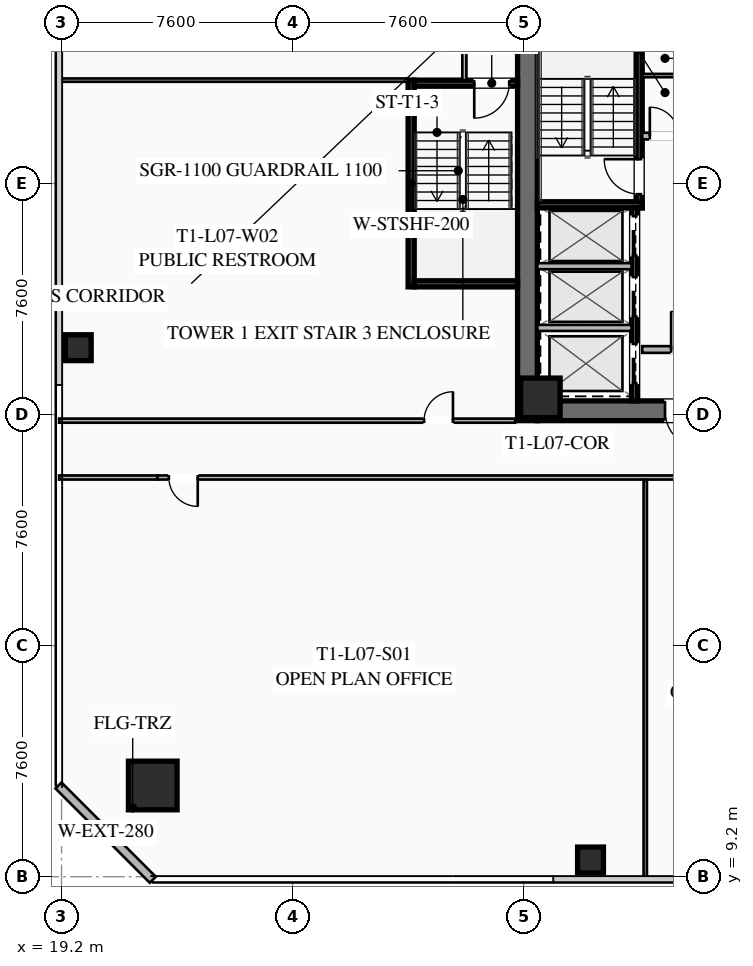
"""IFC4 building model, lengths in metres.
Left out: names, types, materials, properties, quantities, classifications, styles, units other than length and angle.
Written with IfcOpenShell. Run it as: python <this file> out.ifc"""

import sys

from ifc_helpers import new_model, si_unit, direction, frame, frame_2d, origin, origin_2d, place, context, subcontext, project, spatial, rectangle, hollow_rectangle, extrude, element, fill, save


model = new_model("IFC4")
c1 = context("Model", 3, precision=1e-05, world=origin(), true_north=direction((0.0, 1.0)))
c2 = subcontext(c1, "Body", "Model", "MODEL_VIEW")
j1 = project(units=[si_unit("LENGTHUNIT", "METRE"), si_unit("PLANEANGLEUNIT", "RADIAN")], contexts=[c1])
p1 = place(None, origin())
s1 = spatial("IfcSite", under=j1, at=p1, CompositionType="ELEMENT")
p2 = place(p1, origin())
s2 = spatial("IfcBuilding", under=s1, at=p2, CompositionType="ELEMENT")
p3 = place(p2, frame((0.0, 0.0, 31.7)))
s3 = spatial("IfcBuildingStorey", under=s2, at=p3, CompositionType="ELEMENT", Elevation=31.7)
p4 = place(p3, frame((34.525, 24.2, 0.0), z_axis=(0.0, 0.0, 1.0), x_axis=(0.0, 1.0, 0.0)))
e1 = element("IfcWall", 1, at=p4, inside=s3, PredefinedType="SHEAR", context=c2, shape_type="SweptSolid", body=[
    extrude(rectangle(XDim=15.6, YDim=0.65, at=frame_2d((7.8, 0.0))), origin(), (0.0, 0.0, 1.0), 3.55),
])
p5 = place(p3, frame((49.15, 24.525, 0.0), z_axis=(0.0, 0.0, 1.0), x_axis=(-1.0, 0.0, 0.0)))
e2 = element("IfcWall", 2, at=p5, inside=s3, PredefinedType="SHEAR", context=c2, shape_type="SweptSolid", body=[
    extrude(rectangle(XDim=14.3, YDim=0.65, at=frame_2d((7.15, 0.0))), origin(), (0.0, 0.0, 1.0), 3.55),
])
p6 = place(p5, frame((8.85, 0.0, 0.0)))
e3 = element("IfcOpeningElement", 3, at=p6, cuts=e2, PredefinedType="OPENING", context=c2, shape_type="SweptSolid", body=[
    extrude(rectangle(XDim=1.25, YDim=2.25, at=frame_2d((0.625, 1.125))), frame((0.0, 0.335, 0.0), z_axis=(0.0, -1.0, 0.0), x_axis=(1.0, 0.0, 0.0)), (0.0, 0.0, 1.0), 0.67),
])
p7 = place(p5, frame((3.8, 0.0, 0.0)))
e4 = element("IfcOpeningElement", 4, at=p7, cuts=e2, PredefinedType="OPENING", context=c2, shape_type="SweptSolid", body=[
    extrude(rectangle(XDim=1.25, YDim=2.25, at=frame_2d((0.625, 1.125))), frame((0.0, 0.335, 0.0), z_axis=(0.0, -1.0, 0.0), x_axis=(1.0, 0.0, 0.0)), (0.0, 0.0, 1.0), 0.67),
])
p8 = place(p3, frame((34.95, 24.95, 0.0), z_axis=(0.0, 0.0, 1.0), x_axis=(1.0, 0.0, 0.0)))
e5 = element("IfcColumn", 5, at=p8, inside=s3, PredefinedType="COLUMN", context=c2, shape_type="SweptSolid", body=[
    extrude(hollow_rectangle(XDim=1.3, YDim=1.3, WallThickness=0.05, at=origin_2d()), origin(), (0.0, 0.0, 1.0), 3.35),
])
p9 = place(p3, frame((22.2, 12.2, 0.0), z_axis=(0.0, 0.0, 1.0), x_axis=(1.0, 0.0, 0.0)))
e6 = element("IfcColumn", 6, at=p9, inside=s3, PredefinedType="COLUMN", context=c2, shape_type="SweptSolid", body=[
    extrude(hollow_rectangle(XDim=1.6, YDim=1.6, WallThickness=0.06, at=origin_2d()), origin(), (0.0, 0.0, 1.0), 3.35),
])
for number, where, z_axis, x_axis in (
    (7, (36.6, 9.75, 0.0), (0.0, 0.0, 1.0), (1.0, 0.0, 0.0)),
    (8, (19.75, 26.6, 0.0), (0.0, 0.0, 1.0), (1.0, 0.0, 0.0)),
):
    element("IfcColumn", number, at=place(p3, frame(where, z_axis=z_axis, x_axis=x_axis)), inside=s3, PredefinedType="COLUMN", context=c2, shape_type="SweptSolid", body=[
        extrude(hollow_rectangle(XDim=0.85, YDim=0.85, WallThickness=0.035, at=origin_2d()), origin(), (0.0, 0.0, 1.0), 3.35),
    ])
p10 = place(p3, frame((22.2, 9.1, 0.0), z_axis=(0.0, 0.0, 1.0), x_axis=(-0.707106781187, 0.707106781187, 0.0)))
e9 = element("IfcWall", 9, at=p10, inside=s3, PredefinedType="SOLIDWALL", context=c2, shape_type="SweptSolid", body=[
    extrude(rectangle(XDim=4.384, YDim=0.28, at=frame_2d((2.192, 0.0))), origin(), (0.0, 0.0, 1.0), 3.35),
])
p11 = place(p3, frame((38.2, 31.2, 0.0), z_axis=(0.0, 0.0, 1.0), x_axis=(0.0, 1.0, 0.0)))
e10 = element("IfcWall", 10, at=p11, inside=s3, PredefinedType="SHEAR", context=c2, shape_type="SweptSolid", body=[
    extrude(rectangle(XDim=7.95, YDim=0.2, at=frame_2d((3.975, 0.0))), origin(), (0.0, 0.0, 1.0), 3.35),
])
p12 = place(p11, frame((0.45, 0.0, 0.0)))
e11 = element("IfcOpeningElement", 11, at=p12, cuts=e10, PredefinedType="OPENING", context=c2, shape_type="SweptSolid", body=[
    extrude(rectangle(XDim=1.15, YDim=2.2, at=frame_2d((0.575, 1.1))), frame((0.0, 0.11, 0.0), z_axis=(0.0, -1.0, 0.0), x_axis=(1.0, 0.0, 0.0)), (0.0, 0.0, 1.0), 0.22),
])
p13 = place(p3, frame((34.85, 31.3, 0.0), z_axis=(0.0, 0.0, 1.0), x_axis=(1.0, 0.0, 0.0)))
e12 = element("IfcWall", 12, at=p13, inside=s3, PredefinedType="SHEAR", context=c2, shape_type="SweptSolid", body=[
    extrude(rectangle(XDim=3.45, YDim=0.2, at=frame_2d((1.725, 0.0))), origin(), (0.0, 0.0, 1.0), 3.35),
])
p14 = place(p3, frame((38.3, 33.56, 0.0), z_axis=(0.0, 0.0, 1.0), x_axis=(1.0, 0.0, 0.0)))
e13 = element("IfcWall", 13, at=p14, inside=s3, PredefinedType="SOLIDWALL", context=c2, shape_type="SweptSolid", body=[
    extrude(rectangle(XDim=3.15, YDim=0.22, at=frame_2d((1.575, 0.0))), origin(), (0.0, 0.0, 1.0), 2.703),
])
p15 = place(p14, frame((0.25, 0.0, 0.0)))
e14 = element("IfcOpeningElement", 14, at=p15, cuts=e13, PredefinedType="OPENING", context=c2, shape_type="SweptSolid", body=[
    extrude(rectangle(XDim=0.95, YDim=2.05, at=frame_2d((0.475, 1.025))), frame((0.0, 0.12, 0.0), z_axis=(0.0, -1.0, 0.0), x_axis=(1.0, 0.0, 0.0)), (0.0, 0.0, 1.0), 0.24),
])
p16 = place(p14, frame((1.95, 0.0, 0.0)))
e15 = element("IfcOpeningElement", 15, at=p16, cuts=e13, PredefinedType="OPENING", context=c2, shape_type="SweptSolid", body=[
    extrude(rectangle(XDim=0.95, YDim=2.05, at=frame_2d((0.475, 1.025))), frame((0.0, 0.12, 0.0), z_axis=(0.0, -1.0, 0.0), x_axis=(1.0, 0.0, 0.0)), (0.0, 0.0, 1.0), 0.24),
])
p17 = place(p3, frame((38.3, 26.54, 0.0), z_axis=(0.0, 0.0, 1.0), x_axis=(1.0, 0.0, 0.0)))
e16 = element("IfcWall", 16, at=p17, inside=s3, PredefinedType="SOLIDWALL", context=c2, shape_type="SweptSolid", body=[
    extrude(rectangle(XDim=3.15, YDim=0.22, at=frame_2d((1.575, 0.0))), origin(), (0.0, 0.0, 1.0), 2.703),
])
p18 = place(p17, frame((0.95, 0.0, 0.0)))
e17 = element("IfcOpeningElement", 17, at=p18, cuts=e16, PredefinedType="OPENING", context=c2, shape_type="SweptSolid", body=[
    extrude(rectangle(XDim=1.25, YDim=2.25, at=frame_2d((0.625, 1.125))), frame((0.0, 0.12, 0.0), z_axis=(0.0, -1.0, 0.0), x_axis=(1.0, 0.0, 0.0)), (0.0, 0.0, 1.0), 0.24),
])
p19 = place(p3, frame((38.05, 24.85, 0.0), z_axis=(0.0, 0.0, 1.0), x_axis=(0.0, 1.0, 0.0)))
e18 = element("IfcWall", 18, at=p19, inside=s3, PredefinedType="SHEAR", context=c2, shape_type="SweptSolid", body=[
    extrude(rectangle(XDim=6.35, YDim=0.2, at=frame_2d((3.175, 0.0))), origin(), (0.0, 0.0, 1.0), 3.35),
])
p20 = place(p19, frame((4.775, 0.0, 0.0)))
e19 = element("IfcOpeningElement", 19, at=p20, cuts=e18, PredefinedType="OPENING", context=c2, shape_type="SweptSolid", body=[
    extrude(rectangle(XDim=1.3, YDim=2.25, at=frame_2d((0.65, 1.125))), frame((0.0, 0.11, 0.0), z_axis=(0.0, -1.0, 0.0), x_axis=(1.0, 0.0, 0.0)), (0.0, 0.0, 1.0), 0.22),
])
p21 = place(p19, frame((2.775, 0.0, 0.0)))
e20 = element("IfcOpeningElement", 20, at=p21, cuts=e18, PredefinedType="OPENING", context=c2, shape_type="SweptSolid", body=[
    extrude(rectangle(XDim=1.3, YDim=2.25, at=frame_2d((0.65, 1.125))), frame((0.0, 0.11, 0.0), z_axis=(0.0, -1.0, 0.0), x_axis=(1.0, 0.0, 0.0)), (0.0, 0.0, 1.0), 0.22),
])
p22 = place(p19, frame((0.575, 0.0, 0.0)))
e21 = element("IfcOpeningElement", 21, at=p22, cuts=e18, PredefinedType="OPENING", context=c2, shape_type="SweptSolid", body=[
    extrude(rectangle(XDim=1.3, YDim=2.25, at=frame_2d((0.65, 1.125))), frame((0.0, 0.11, 0.0), z_axis=(0.0, -1.0, 0.0), x_axis=(1.0, 0.0, 0.0)), (0.0, 0.0, 1.0), 0.22),
])
for number, where, z_axis, x_axis in (
    (22, (34.85, 27.25, 0.0), (0.0, 0.0, 1.0), (1.0, 0.0, 0.0)),
    (23, (34.85, 29.28, 0.0), (0.0, 0.0, 1.0), (1.0, 0.0, 0.0)),
):
    element("IfcWall", number, at=place(p3, frame(where, z_axis=z_axis, x_axis=x_axis)), inside=s3, PredefinedType="SOLIDWALL", context=c2, shape_type="SweptSolid", body=[
        extrude(rectangle(XDim=3.1, YDim=0.2, at=frame_2d((1.55, 0.0))), origin(), (0.0, 0.0, 1.0), 3.35),
    ])
p23 = place(p3, frame((38.3, 35.55, 0.0), z_axis=(0.0, 0.0, 1.0), x_axis=(1.0, 0.0, 0.0)))
e24 = element("IfcWall", 24, at=p23, inside=s3, PredefinedType="PARTITIONING", context=c2, shape_type="SweptSolid", body=[
    extrude(rectangle(XDim=3.15, YDim=0.11, at=frame_2d((1.575, 0.0))), origin(), (0.0, 0.0, 1.0), 2.703),
])
p24 = place(p3, frame((30.7, 28.6, 0.0), z_axis=(0.0, 0.0, 1.0), x_axis=(0.0, 1.0, 0.0)))
e25 = element("IfcWall", 25, at=p24, inside=s3, PredefinedType="SHEAR", context=c2, shape_type="SweptSolid", body=[
    extrude(rectangle(XDim=6.8, YDim=0.2, at=frame_2d((3.4, 0.0))), origin(), (0.0, 0.0, 1.0), 3.35),
])
p25 = place(p3, frame((34.2, 35.3, 0.0), z_axis=(0.0, 0.0, 1.0), x_axis=(-1.0, 0.0, 0.0)))
e26 = element("IfcWall", 26, at=p25, inside=s3, PredefinedType="SHEAR", context=c2, shape_type="SweptSolid", body=[
    extrude(rectangle(XDim=3.4, YDim=0.2, at=frame_2d((1.7, 0.0))), origin(), (0.0, 0.0, 1.0), 3.35),
])
p26 = place(p25, frame((0.275, 0.0, 0.0)))
e27 = element("IfcOpeningElement", 27, at=p26, cuts=e26, PredefinedType="OPENING", context=c2, shape_type="SweptSolid", body=[
    extrude(rectangle(XDim=1.15, YDim=2.2, at=frame_2d((0.575, 1.1))), frame((0.0, 0.11, 0.0), z_axis=(0.0, -1.0, 0.0), x_axis=(1.0, 0.0, 0.0)), (0.0, 0.0, 1.0), 0.22),
])
p27 = place(p3, frame((30.8, 28.7, 0.0), z_axis=(0.0, 0.0, 1.0), x_axis=(1.0, 0.0, 0.0)))
e28 = element("IfcWall", 28, at=p27, inside=s3, PredefinedType="SHEAR", context=c2, shape_type="SweptSolid", body=[
    extrude(rectangle(XDim=3.4, YDim=0.2, at=frame_2d((1.7, 0.0))), origin(), (0.0, 0.0, 1.0), 3.35),
])
p28 = place(p3, frame((32.45, 35.4, 0.0), z_axis=(0.0, 0.0, 1.0), x_axis=(0.0, 1.0, 0.0)))
e29 = element("IfcWall", 29, at=p28, inside=s3, PredefinedType="PARTITIONING", context=c2, shape_type="SweptSolid", body=[
    extrude(rectangle(XDim=4.4, YDim=0.135, at=frame_2d((2.2, 0.0))), origin(), (0.0, 0.0, 1.0), 2.703),
])
p29 = place(p3, frame((51.35, 22.33, 0.0), z_axis=(0.0, 0.0, 1.0), x_axis=(-1.0, 0.0, 0.0)))
e30 = element("IfcWall", 30, at=p29, inside=s3, PredefinedType="PARTITIONING", context=c2, shape_type="SweptSolid", body=[
    extrude(rectangle(XDim=29.0, YDim=0.135, at=frame_2d((14.5, 0.0))), origin(), (0.0, 0.0, 1.0), 2.703),
])
p30 = place(p29, frame((27.67, 0.0, 0.0)))
e31 = element("IfcOpeningElement", 31, at=p30, cuts=e30, PredefinedType="OPENING", context=c2, shape_type="SweptSolid", body=[
    extrude(rectangle(XDim=0.95, YDim=2.05, at=frame_2d((0.475, 1.025))), frame((0.0, 0.077, 0.0), z_axis=(0.0, -1.0, 0.0), x_axis=(1.0, 0.0, 0.0)), (0.0, 0.0, 1.0), 0.155),
])
p31 = place(p29, frame((8.775, 0.0, 0.0)))
e32 = element("IfcOpeningElement", 32, at=p31, cuts=e30, PredefinedType="OPENING", context=c2, shape_type="SweptSolid", body=[
    extrude(rectangle(XDim=0.95, YDim=2.05, at=frame_2d((0.475, 1.025))), frame((0.0, 0.077, 0.0), z_axis=(0.0, -1.0, 0.0), x_axis=(1.0, 0.0, 0.0)), (0.0, 0.0, 1.0), 0.155),
])
p32 = place(p29, frame((0.38, 0.0, 0.0)))
e33 = element("IfcOpeningElement", 33, at=p32, cuts=e30, PredefinedType="OPENING", context=c2, shape_type="SweptSolid", body=[
    extrude(rectangle(XDim=0.95, YDim=2.05, at=frame_2d((0.475, 1.025))), frame((0.0, 0.077, 0.0), z_axis=(0.0, -1.0, 0.0), x_axis=(1.0, 0.0, 0.0)), (0.0, 0.0, 1.0), 0.155),
])
p33 = place(p3, frame((19.12, 22.33, 0.0), z_axis=(0.0, 0.0, 1.0), x_axis=(1.0, 0.0, 0.0)))
e34 = element("IfcWall", 34, at=p33, inside=s3, PredefinedType="PARTITIONING", context=c2, shape_type="SweptSolid", body=[
    extrude(rectangle(XDim=3.23, YDim=0.135, at=frame_2d((1.615, 0.0))), origin(), (0.0, 0.0, 1.0), 2.703),
])
p34 = place(p3, frame((38.4, 9.12, 0.0), z_axis=(0.0, 0.0, 1.0), x_axis=(0.0, 1.0, 0.0)))
e35 = element("IfcWall", 35, at=p34, inside=s3, PredefinedType="PARTITIONING", context=c2, shape_type="SweptSolid", body=[
    extrude(rectangle(XDim=13.13, YDim=0.11, at=frame_2d((6.565, 0.0))), origin(), (0.0, 0.0, 1.0), 2.703),
])
p35 = place(p3, frame((19.12, 24.2, 0.0), z_axis=(0.0, 0.0, 1.0), x_axis=(1.0, 0.0, 0.0)))
e36 = element("IfcWall", 36, at=p35, inside=s3, PredefinedType="PARTITIONING", context=c2, shape_type="SweptSolid", body=[
    extrude(rectangle(XDim=15.0, YDim=0.135, at=frame_2d((7.5, 0.0))), origin(), (0.0, 0.0, 1.0), 2.703),
])
p36 = place(p35, frame((12.005, 0.0, 0.0)))
e37 = element("IfcOpeningElement", 37, at=p36, cuts=e36, PredefinedType="OPENING", context=c2, shape_type="SweptSolid", body=[
    extrude(rectangle(XDim=0.95, YDim=2.05, at=frame_2d((0.475, 1.025))), frame((0.0, 0.077, 0.0), z_axis=(0.0, -1.0, 0.0), x_axis=(1.0, 0.0, 0.0)), (0.0, 0.0, 1.0), 0.155),
])
p37 = place(p3, frame((30.6, 35.4, 0.0), z_axis=(0.0, 0.0, 1.0), x_axis=(-1.0, 0.0, 0.0)))
e38 = element("IfcWall", 38, at=p37, inside=s3, PredefinedType="PARTITIONING", context=c2, shape_type="SweptSolid", body=[
    extrude(rectangle(XDim=11.48, YDim=0.11, at=frame_2d((5.74, 0.0))), origin(), (0.0, 0.0, 1.0), 2.703),
])
p38 = place(p6, origin())
e39 = element("IfcDoor", 39, at=p38, inside=s3, OperationType="SINGLE_SWING_LEFT", PredefinedType="DOOR", context=c2, shape_type="SweptSolid", body=[
    extrude(rectangle(XDim=1.25, YDim=2.25, at=frame_2d((0.625, 1.125))), frame((0.0, 0.025, 0.0), z_axis=(0.0, -1.0, 0.0), x_axis=(1.0, 0.0, 0.0)), (0.0, 0.0, 1.0), 0.05),
])
fill(e3, e39)
p39 = place(p12, origin())
e40 = element("IfcDoor", 40, at=p39, inside=s3, OperationType="SINGLE_SWING_RIGHT", PredefinedType="DOOR", context=c2, shape_type="SweptSolid", body=[
    extrude(rectangle(XDim=1.15, YDim=2.2, at=frame_2d((0.575, 1.1))), frame((0.0, 0.025, 0.0), z_axis=(0.0, -1.0, 0.0), x_axis=(1.0, 0.0, 0.0)), (0.0, 0.0, 1.0), 0.05),
])
fill(e11, e40)
p40 = place(p18, origin())
e41 = element("IfcDoor", 41, at=p40, inside=s3, OperationType="SINGLE_SWING_LEFT", PredefinedType="DOOR", context=c2, shape_type="SweptSolid", body=[
    extrude(rectangle(XDim=1.25, YDim=2.25, at=frame_2d((0.625, 1.125))), frame((0.0, 0.025, 0.0), z_axis=(0.0, -1.0, 0.0), x_axis=(1.0, 0.0, 0.0)), (0.0, 0.0, 1.0), 0.05),
])
fill(e17, e41)
p41 = place(p15, origin())
e42 = element("IfcDoor", 42, at=p41, inside=s3, OperationType="SINGLE_SWING_LEFT", PredefinedType="DOOR", context=c2, shape_type="SweptSolid", body=[
    extrude(rectangle(XDim=0.95, YDim=2.05, at=frame_2d((0.475, 1.025))), frame((0.0, 0.025, 0.0), z_axis=(0.0, -1.0, 0.0), x_axis=(1.0, 0.0, 0.0)), (0.0, 0.0, 1.0), 0.05),
])
fill(e14, e42)
p42 = place(p26, origin())
e43 = element("IfcDoor", 43, at=p42, inside=s3, OperationType="SINGLE_SWING_RIGHT", PredefinedType="DOOR", context=c2, shape_type="SweptSolid", body=[
    extrude(rectangle(XDim=1.15, YDim=2.2, at=frame_2d((0.575, 1.1))), frame((0.0, 0.025, 0.0), z_axis=(0.0, -1.0, 0.0), x_axis=(1.0, 0.0, 0.0)), (0.0, 0.0, 1.0), 0.05),
])
fill(e27, e43)
p43 = place(p30, origin())
e44 = element("IfcDoor", 44, at=p43, inside=s3, OperationType="SINGLE_SWING_LEFT", PredefinedType="DOOR", context=c2, shape_type="SweptSolid", body=[
    extrude(rectangle(XDim=0.95, YDim=2.05, at=frame_2d((0.475, 1.025))), frame((0.0, 0.025, 0.0), z_axis=(0.0, -1.0, 0.0), x_axis=(1.0, 0.0, 0.0)), (0.0, 0.0, 1.0), 0.05),
])
fill(e31, e44)
p44 = place(p36, origin())
e45 = element("IfcDoor", 45, at=p44, inside=s3, OperationType="SINGLE_SWING_RIGHT", PredefinedType="DOOR", context=c2, shape_type="SweptSolid", body=[
    extrude(rectangle(XDim=0.95, YDim=2.05, at=frame_2d((0.475, 1.025))), frame((0.0, 0.025, 0.0), z_axis=(0.0, -1.0, 0.0), x_axis=(1.0, 0.0, 0.0)), (0.0, 0.0, 1.0), 0.05),
])
fill(e37, e45)
p45 = place(p20, origin())
e46 = element("IfcDoor", 46, at=p45, inside=s3, OperationType="SLIDING_TO_LEFT", PredefinedType="DOOR", context=c2, shape_type="SweptSolid", body=[
    extrude(rectangle(XDim=1.3, YDim=2.25, at=frame_2d((0.65, 1.125))), frame((0.0, 0.025, 0.0), z_axis=(0.0, -1.0, 0.0), x_axis=(1.0, 0.0, 0.0)), (0.0, 0.0, 1.0), 0.05),
])
fill(e19, e46)
p46 = place(p21, origin())
e47 = element("IfcDoor", 47, at=p46, inside=s3, OperationType="SLIDING_TO_LEFT", PredefinedType="DOOR", context=c2, shape_type="SweptSolid", body=[
    extrude(rectangle(XDim=1.3, YDim=2.25, at=frame_2d((0.65, 1.125))), frame((0.0, 0.025, 0.0), z_axis=(0.0, -1.0, 0.0), x_axis=(1.0, 0.0, 0.0)), (0.0, 0.0, 1.0), 0.05),
])
fill(e20, e47)
p47 = place(p22, origin())
e48 = element("IfcDoor", 48, at=p47, inside=s3, OperationType="SLIDING_TO_LEFT", PredefinedType="DOOR", context=c2, shape_type="SweptSolid", body=[
    extrude(rectangle(XDim=1.3, YDim=2.25, at=frame_2d((0.65, 1.125))), frame((0.0, 0.025, 0.0), z_axis=(0.0, -1.0, 0.0), x_axis=(1.0, 0.0, 0.0)), (0.0, 0.0, 1.0), 0.05),
])
fill(e21, e48)
save(model, sys.argv[1])
